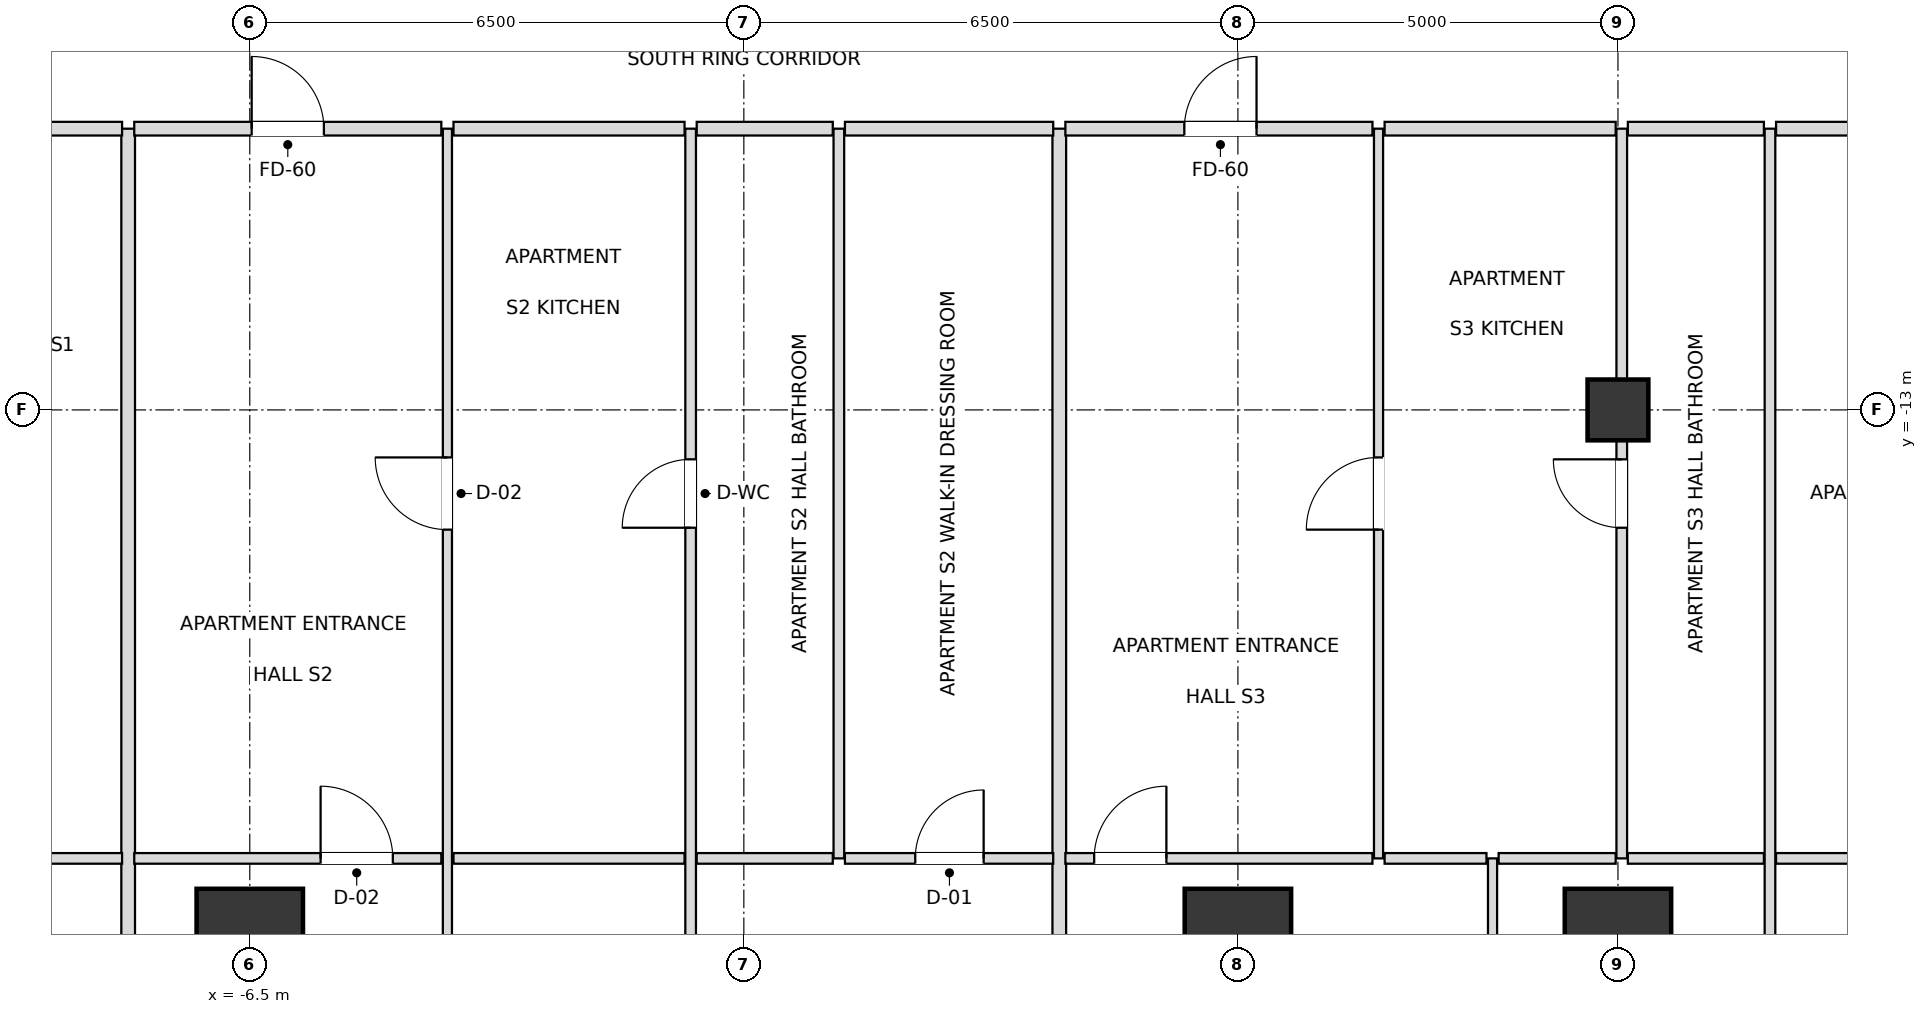
"""IFC4 building model, lengths in metres.
Left out: names, types, materials, properties, quantities, classifications, styles, units other than length and angle.
Written with IfcOpenShell. Run it as: python <this file> out.ifc"""

import sys

from ifc_helpers import new_model, si_unit, direction, frame, frame_2d, origin, origin_2d, place, context, subcontext, project, spatial, rectangle, extrude, element, fill, save


model = new_model("IFC4")
c1 = context("Model", 3, precision=1e-05, world=origin(), true_north=direction((0.0, 1.0)))
c2 = subcontext(c1, "Body", "Model", "MODEL_VIEW")
j1 = project(units=[si_unit("LENGTHUNIT", "METRE"), si_unit("PLANEANGLEUNIT", "RADIAN")], contexts=[c1])
p1 = place(None, origin())
s1 = spatial("IfcSite", under=j1, at=p1, CompositionType="ELEMENT")
p2 = place(p1, origin())
s2 = spatial("IfcBuilding", under=s1, at=p2, CompositionType="ELEMENT")
p3 = place(p2, frame((0.0, 0.0, 32.4)))
s3 = spatial("IfcBuildingStorey", under=s2, at=p3, CompositionType="ELEMENT", Elevation=32.4)
for number, where, z_axis, x_axis in (
    (1, (-6.5, -20.0, 0.0), (0.0, 0.0, 1.0), (1.0, 0.0, 0.0)),
    (2, (6.5, -20.0, 0.0), (0.0, 0.0, 1.0), (1.0, 0.0, 0.0)),
    (3, (11.5, -20.0, 0.0), (0.0, 0.0, 1.0), (1.0, 0.0, 0.0)),
):
    element("IfcColumn", number, at=place(p3, frame(where, z_axis=z_axis, x_axis=x_axis)), inside=s3, PredefinedType="USERDEFINED", context=c2, shape_type="SweptSolid", body=[
        extrude(rectangle(XDim=1.4, YDim=1.4, at=origin_2d()), origin(), (0.0, 0.0, 1.0), 3.6),
    ])
p4 = place(p3, frame((11.5, -13.0, 0.0), z_axis=(0.0, 0.0, 1.0), x_axis=(1.0, 0.0, 0.0)))
e4 = element("IfcColumn", 4, at=p4, inside=s3, PredefinedType="COLUMN", context=c2, shape_type="SweptSolid", body=[
    extrude(rectangle(XDim=0.8, YDim=0.8, at=origin_2d()), origin(), (0.0, 0.0, 1.0), 3.6),
])
p5 = place(p3, frame((-8.1, -24.9, 0.0), z_axis=(0.0, 0.0, 1.0), x_axis=(0.0, 1.0, 0.0)))
e5 = element("IfcWall", 5, at=p5, inside=s3, PredefinedType="PARTITIONING", context=c2, shape_type="SweptSolid", body=[
    extrude(rectangle(XDim=15.6, YDim=0.18, at=frame_2d((7.8, 0.0))), origin(), (0.0, 0.0, 1.0), 2.816),
])
p6 = place(p3, frame((-3.9, -24.9, 0.0), z_axis=(0.0, 0.0, 1.0), x_axis=(0.0, 1.0, 0.0)))
e6 = element("IfcWall", 6, at=p6, inside=s3, PredefinedType="PARTITIONING", context=c2, shape_type="SweptSolid", body=[
    extrude(rectangle(XDim=15.6, YDim=0.12, at=frame_2d((7.8, 0.0))), origin(), (0.0, 0.0, 1.0), 2.816),
])
p7 = place(p6, frame((10.325, 0.0, 0.0)))
e7 = element("IfcOpeningElement", 7, at=p7, cuts=e6, PredefinedType="OPENING", context=c2, shape_type="SweptSolid", body=[
    extrude(rectangle(XDim=0.95, YDim=2.1, at=frame_2d((0.475, 1.05))), frame((0.0, 0.07, 0.0), z_axis=(0.0, -1.0, 0.0), x_axis=(1.0, 0.0, 0.0)), (0.0, 0.0, 1.0), 0.14),
])
p8 = place(p6, frame((2.55, 0.0, 0.0)))
e8 = element("IfcOpeningElement", 8, at=p8, cuts=e6, PredefinedType="OPENING", context=c2, shape_type="SweptSolid", body=[
    extrude(rectangle(XDim=0.9, YDim=2.1, at=frame_2d((0.45, 1.05))), frame((0.0, 0.07, 0.0), z_axis=(0.0, -1.0, 0.0), x_axis=(1.0, 0.0, 0.0)), (0.0, 0.0, 1.0), 0.14),
])
p9 = place(p3, frame((-0.7, -24.9, 0.0), z_axis=(0.0, 0.0, 1.0), x_axis=(0.0, 1.0, 0.0)))
e9 = element("IfcWall", 9, at=p9, inside=s3, PredefinedType="PARTITIONING", context=c2, shape_type="SweptSolid", body=[
    extrude(rectangle(XDim=15.6, YDim=0.14, at=frame_2d((7.8, 0.0))), origin(), (0.0, 0.0, 1.0), 2.816),
])
p10 = place(p9, frame((10.35, 0.0, 0.0)))
e10 = element("IfcOpeningElement", 10, at=p10, cuts=e9, PredefinedType="OPENING", context=c2, shape_type="SweptSolid", body=[
    extrude(rectangle(XDim=0.9, YDim=2.1, at=frame_2d((0.45, 1.05))), frame((0.0, 0.08, 0.0), z_axis=(0.0, -1.0, 0.0), x_axis=(1.0, 0.0, 0.0)), (0.0, 0.0, 1.0), 0.16),
])
p11 = place(p9, frame((2.55, 0.0, 0.0)))
e11 = element("IfcOpeningElement", 11, at=p11, cuts=e9, PredefinedType="OPENING", context=c2, shape_type="SweptSolid", body=[
    extrude(rectangle(XDim=0.9, YDim=2.1, at=frame_2d((0.45, 1.05))), frame((0.0, 0.08, 0.0), z_axis=(0.0, -1.0, 0.0), x_axis=(1.0, 0.0, 0.0)), (0.0, 0.0, 1.0), 0.16),
])
p12 = place(p3, frame((1.25, -18.9, 0.0), z_axis=(0.0, 0.0, 1.0), x_axis=(0.0, 1.0, 0.0)))
e12 = element("IfcWall", 12, at=p12, inside=s3, PredefinedType="PARTITIONING", context=c2, shape_type="SweptSolid", body=[
    extrude(rectangle(XDim=9.6, YDim=0.14, at=frame_2d((4.8, 0.0))), origin(), (0.0, 0.0, 1.0), 2.948),
])
p13 = place(p3, frame((4.15, -24.9, 0.0), z_axis=(0.0, 0.0, 1.0), x_axis=(0.0, 1.0, 0.0)))
e13 = element("IfcWall", 13, at=p13, inside=s3, PredefinedType="PARTITIONING", context=c2, shape_type="SweptSolid", body=[
    extrude(rectangle(XDim=15.6, YDim=0.18, at=frame_2d((7.8, 0.0))), origin(), (0.0, 0.0, 1.0), 2.816),
])
p14 = place(p3, frame((8.35, -18.9, 0.0), z_axis=(0.0, 0.0, 1.0), x_axis=(0.0, 1.0, 0.0)))
e14 = element("IfcWall", 14, at=p14, inside=s3, PredefinedType="PARTITIONING", context=c2, shape_type="SweptSolid", body=[
    extrude(rectangle(XDim=9.6, YDim=0.12, at=frame_2d((4.8, 0.0))), origin(), (0.0, 0.0, 1.0), 2.816),
])
p15 = place(p14, frame((4.325, 0.0, 0.0)))
e15 = element("IfcOpeningElement", 15, at=p15, cuts=e14, PredefinedType="OPENING", context=c2, shape_type="SweptSolid", body=[
    extrude(rectangle(XDim=0.95, YDim=2.1, at=frame_2d((0.475, 1.05))), frame((0.0, 0.07, 0.0), z_axis=(0.0, -1.0, 0.0), x_axis=(1.0, 0.0, 0.0)), (0.0, 0.0, 1.0), 0.14),
])
p16 = place(p3, frame((9.85, -24.9, 0.0), z_axis=(0.0, 0.0, 1.0), x_axis=(0.0, 1.0, 0.0)))
e16 = element("IfcWall", 16, at=p16, inside=s3, PredefinedType="PARTITIONING", context=c2, shape_type="SweptSolid", body=[
    extrude(rectangle(XDim=6.0, YDim=0.12, at=frame_2d((3.0, 0.0))), origin(), (0.0, 0.0, 1.0), 2.816),
])
p17 = place(p16, frame((2.55, 0.0, 0.0)))
e17 = element("IfcOpeningElement", 17, at=p17, cuts=e16, PredefinedType="OPENING", context=c2, shape_type="SweptSolid", body=[
    extrude(rectangle(XDim=0.9, YDim=2.1, at=frame_2d((0.45, 1.05))), frame((0.0, 0.07, 0.0), z_axis=(0.0, -1.0, 0.0), x_axis=(1.0, 0.0, 0.0)), (0.0, 0.0, 1.0), 0.14),
])
p18 = place(p3, frame((11.55, -18.9, 0.0), z_axis=(0.0, 0.0, 1.0), x_axis=(0.0, 1.0, 0.0)))
e18 = element("IfcWall", 18, at=p18, inside=s3, PredefinedType="PARTITIONING", context=c2, shape_type="SweptSolid", body=[
    extrude(rectangle(XDim=9.6, YDim=0.14, at=frame_2d((4.8, 0.0))), origin(), (0.0, 0.0, 1.0), 2.736),
])
p19 = place(p18, frame((4.35, 0.0, 0.0)))
e19 = element("IfcOpeningElement", 19, at=p19, cuts=e18, PredefinedType="OPENING", context=c2, shape_type="SweptSolid", body=[
    extrude(rectangle(XDim=0.9, YDim=2.1, at=frame_2d((0.45, 1.05))), frame((0.0, 0.08, 0.0), z_axis=(0.0, -1.0, 0.0), x_axis=(1.0, 0.0, 0.0)), (0.0, 0.0, 1.0), 0.16),
])
p20 = place(p3, frame((13.5, -24.9, 0.0), z_axis=(0.0, 0.0, 1.0), x_axis=(0.0, 1.0, 0.0)))
e20 = element("IfcWall", 20, at=p20, inside=s3, PredefinedType="PARTITIONING", context=c2, shape_type="SweptSolid", body=[
    extrude(rectangle(XDim=15.6, YDim=0.14, at=frame_2d((7.8, 0.0))), origin(), (0.0, 0.0, 1.0), 2.736),
])
p21 = place(p20, frame((2.55, 0.0, 0.0)))
e21 = element("IfcOpeningElement", 21, at=p21, cuts=e20, PredefinedType="OPENING", context=c2, shape_type="SweptSolid", body=[
    extrude(rectangle(XDim=0.9, YDim=2.1, at=frame_2d((0.45, 1.05))), frame((0.0, 0.08, 0.0), z_axis=(0.0, -1.0, 0.0), x_axis=(1.0, 0.0, 0.0)), (0.0, 0.0, 1.0), 0.16),
])
p22 = place(p3, frame((-12.12, -18.9, 0.0), z_axis=(0.0, 0.0, 1.0), x_axis=(1.0, 0.0, 0.0)))
e22 = element("IfcWall", 22, at=p22, inside=s3, PredefinedType="PARTITIONING", context=c2, shape_type="SweptSolid", body=[
    extrude(rectangle(XDim=3.94, YDim=0.14, at=frame_2d((1.97, 0.0))), origin(), (0.0, 0.0, 1.0), 2.736),
])
p23 = place(p22, frame((1.485, 0.0, 0.0)))
e23 = element("IfcOpeningElement", 23, at=p23, cuts=e22, PredefinedType="OPENING", context=c2, shape_type="SweptSolid", body=[
    extrude(rectangle(XDim=0.95, YDim=2.1, at=frame_2d((0.475, 1.05))), frame((0.0, 0.08, 0.0), z_axis=(0.0, -1.0, 0.0), x_axis=(1.0, 0.0, 0.0)), (0.0, 0.0, 1.0), 0.16),
])
p24 = place(p3, frame((-8.02, -18.9, 0.0), z_axis=(0.0, 0.0, 1.0), x_axis=(1.0, 0.0, 0.0)))
e24 = element("IfcWall", 24, at=p24, inside=s3, PredefinedType="PARTITIONING", context=c2, shape_type="SweptSolid", body=[
    extrude(rectangle(XDim=4.04, YDim=0.14, at=frame_2d((2.02, 0.0))), origin(), (0.0, 0.0, 1.0), 2.816),
])
p25 = place(p24, frame((2.452, 0.0, 0.0)))
e25 = element("IfcOpeningElement", 25, at=p25, cuts=e24, PredefinedType="OPENING", context=c2, shape_type="SweptSolid", body=[
    extrude(rectangle(XDim=0.95, YDim=2.1, at=frame_2d((0.475, 1.05))), frame((0.0, 0.08, 0.0), z_axis=(0.0, -1.0, 0.0), x_axis=(1.0, 0.0, 0.0)), (0.0, 0.0, 1.0), 0.16),
])
p26 = place(p3, frame((-3.82, -18.9, 0.0), z_axis=(0.0, 0.0, 1.0), x_axis=(1.0, 0.0, 0.0)))
e26 = element("IfcWall", 26, at=p26, inside=s3, PredefinedType="PARTITIONING", context=c2, shape_type="SweptSolid", body=[
    extrude(rectangle(XDim=3.04, YDim=0.14, at=frame_2d((1.52, 0.0))), origin(), (0.0, 0.0, 1.0), 3.38),
])
p27 = place(p3, frame((-0.62, -18.9, 0.0), z_axis=(0.0, 0.0, 1.0), x_axis=(1.0, 0.0, 0.0)))
e27 = element("IfcWall", 27, at=p27, inside=s3, PredefinedType="PARTITIONING", context=c2, shape_type="SweptSolid", body=[
    extrude(rectangle(XDim=1.79, YDim=0.14, at=frame_2d((0.895, 0.0))), origin(), (0.0, 0.0, 1.0), 3.38),
])
p28 = place(p3, frame((1.33, -18.9, 0.0), z_axis=(0.0, 0.0, 1.0), x_axis=(1.0, 0.0, 0.0)))
e28 = element("IfcWall", 28, at=p28, inside=s3, PredefinedType="PARTITIONING", context=c2, shape_type="SweptSolid", body=[
    extrude(rectangle(XDim=2.74, YDim=0.14, at=frame_2d((1.37, 0.0))), origin(), (0.0, 0.0, 1.0), 3.38),
])
p29 = place(p28, frame((0.925, 0.0, 0.0)))
e29 = element("IfcOpeningElement", 29, at=p29, cuts=e28, PredefinedType="OPENING", context=c2, shape_type="SweptSolid", body=[
    extrude(rectangle(XDim=0.9, YDim=2.1, at=frame_2d((0.45, 1.05))), frame((0.0, 0.08, 0.0), z_axis=(0.0, -1.0, 0.0), x_axis=(1.0, 0.0, 0.0)), (0.0, 0.0, 1.0), 0.16),
])
p30 = place(p3, frame((4.23, -18.9, 0.0), z_axis=(0.0, 0.0, 1.0), x_axis=(1.0, 0.0, 0.0)))
e30 = element("IfcWall", 30, at=p30, inside=s3, PredefinedType="PARTITIONING", context=c2, shape_type="SweptSolid", body=[
    extrude(rectangle(XDim=4.04, YDim=0.14, at=frame_2d((2.02, 0.0))), origin(), (0.0, 0.0, 1.0), 2.816),
])
p31 = place(p30, frame((0.379, 0.0, 0.0)))
e31 = element("IfcOpeningElement", 31, at=p31, cuts=e30, PredefinedType="OPENING", context=c2, shape_type="SweptSolid", body=[
    extrude(rectangle(XDim=0.95, YDim=2.1, at=frame_2d((0.475, 1.05))), frame((0.0, 0.08, 0.0), z_axis=(0.0, -1.0, 0.0), x_axis=(1.0, 0.0, 0.0)), (0.0, 0.0, 1.0), 0.16),
])
p32 = place(p3, frame((8.43, -18.9, 0.0), z_axis=(0.0, 0.0, 1.0), x_axis=(1.0, 0.0, 0.0)))
e32 = element("IfcWall", 32, at=p32, inside=s3, PredefinedType="PARTITIONING", context=c2, shape_type="SweptSolid", body=[
    extrude(rectangle(XDim=1.34, YDim=0.14, at=frame_2d((0.67, 0.0))), origin(), (0.0, 0.0, 1.0), 3.38),
])
p33 = place(p3, frame((9.93, -18.9, 0.0), z_axis=(0.0, 0.0, 1.0), x_axis=(1.0, 0.0, 0.0)))
e33 = element("IfcWall", 33, at=p33, inside=s3, PredefinedType="PARTITIONING", context=c2, shape_type="SweptSolid", body=[
    extrude(rectangle(XDim=1.54, YDim=0.14, at=frame_2d((0.77, 0.0))), origin(), (0.0, 0.0, 1.0), 3.38),
])
p34 = place(p3, frame((11.63, -18.9, 0.0), z_axis=(0.0, 0.0, 1.0), x_axis=(1.0, 0.0, 0.0)))
e34 = element("IfcWall", 34, at=p34, inside=s3, PredefinedType="PARTITIONING", context=c2, shape_type="SweptSolid", body=[
    extrude(rectangle(XDim=1.79, YDim=0.14, at=frame_2d((0.895, 0.0))), origin(), (0.0, 0.0, 1.0), 2.736),
])
p35 = place(p3, frame((13.58, -18.9, 0.0), z_axis=(0.0, 0.0, 1.0), x_axis=(1.0, 0.0, 0.0)))
e35 = element("IfcWall", 35, at=p35, inside=s3, PredefinedType="PARTITIONING", context=c2, shape_type="SweptSolid", body=[
    extrude(rectangle(XDim=4.74, YDim=0.14, at=frame_2d((2.37, 0.0))), origin(), (0.0, 0.0, 1.0), 2.736),
])
p36 = place(p35, frame((1.905, 0.0, 0.0)))
e36 = element("IfcOpeningElement", 36, at=p36, cuts=e35, PredefinedType="OPENING", context=c2, shape_type="SweptSolid", body=[
    extrude(rectangle(XDim=0.95, YDim=2.1, at=frame_2d((0.475, 1.05))), frame((0.0, 0.08, 0.0), z_axis=(0.0, -1.0, 0.0), x_axis=(1.0, 0.0, 0.0)), (0.0, 0.0, 1.0), 0.16),
])
p37 = place(p3, frame((-13.67, -9.3, 0.0), z_axis=(0.0, 0.0, 1.0), x_axis=(1.0, 0.0, 0.0)))
e37 = element("IfcWall", 37, at=p37, inside=s3, PredefinedType="PARTITIONING", context=c2, shape_type="SweptSolid", body=[
    extrude(rectangle(XDim=5.49, YDim=0.18, at=frame_2d((2.745, 0.0))), origin(), (0.0, 0.0, 1.0), 3.38),
])
p38 = place(p37, frame((3.245, 0.0, 0.0)))
e38 = element("IfcOpeningElement", 38, at=p38, cuts=e37, PredefinedType="OPENING", context=c2, shape_type="SweptSolid", body=[
    extrude(rectangle(XDim=0.95, YDim=2.15, at=frame_2d((0.475, 1.075))), frame((0.0, 0.1, 0.0), z_axis=(0.0, -1.0, 0.0), x_axis=(1.0, 0.0, 0.0)), (0.0, 0.0, 1.0), 0.2),
])
p39 = place(p3, frame((-8.02, -9.3, 0.0), z_axis=(0.0, 0.0, 1.0), x_axis=(1.0, 0.0, 0.0)))
e39 = element("IfcWall", 39, at=p39, inside=s3, PredefinedType="PARTITIONING", context=c2, shape_type="SweptSolid", body=[
    extrude(rectangle(XDim=4.04, YDim=0.18, at=frame_2d((2.02, 0.0))), origin(), (0.0, 0.0, 1.0), 2.816),
])
p40 = place(p39, frame((1.545, 0.0, 0.0)))
e40 = element("IfcOpeningElement", 40, at=p40, cuts=e39, PredefinedType="OPENING", context=c2, shape_type="SweptSolid", body=[
    extrude(rectangle(XDim=0.95, YDim=2.15, at=frame_2d((0.475, 1.075))), frame((0.0, 0.1, 0.0), z_axis=(0.0, -1.0, 0.0), x_axis=(1.0, 0.0, 0.0)), (0.0, 0.0, 1.0), 0.2),
])
p41 = place(p3, frame((-3.82, -9.3, 0.0), z_axis=(0.0, 0.0, 1.0), x_axis=(1.0, 0.0, 0.0)))
e41 = element("IfcWall", 41, at=p41, inside=s3, PredefinedType="PARTITIONING", context=c2, shape_type="SweptSolid", body=[
    extrude(rectangle(XDim=3.04, YDim=0.18, at=frame_2d((1.52, 0.0))), origin(), (0.0, 0.0, 1.0), 3.38),
])
p42 = place(p3, frame((-0.62, -9.3, 0.0), z_axis=(0.0, 0.0, 1.0), x_axis=(1.0, 0.0, 0.0)))
e42 = element("IfcWall", 42, at=p42, inside=s3, PredefinedType="PARTITIONING", context=c2, shape_type="SweptSolid", body=[
    extrude(rectangle(XDim=1.79, YDim=0.18, at=frame_2d((0.895, 0.0))), origin(), (0.0, 0.0, 1.0), 3.38),
])
p43 = place(p3, frame((1.33, -9.3, 0.0), z_axis=(0.0, 0.0, 1.0), x_axis=(1.0, 0.0, 0.0)))
e43 = element("IfcWall", 43, at=p43, inside=s3, PredefinedType="PARTITIONING", context=c2, shape_type="SweptSolid", body=[
    extrude(rectangle(XDim=2.74, YDim=0.18, at=frame_2d((1.37, 0.0))), origin(), (0.0, 0.0, 1.0), 3.38),
])
p44 = place(p3, frame((4.23, -9.3, 0.0), z_axis=(0.0, 0.0, 1.0), x_axis=(1.0, 0.0, 0.0)))
e44 = element("IfcWall", 44, at=p44, inside=s3, PredefinedType="PARTITIONING", context=c2, shape_type="SweptSolid", body=[
    extrude(rectangle(XDim=4.04, YDim=0.18, at=frame_2d((2.02, 0.0))), origin(), (0.0, 0.0, 1.0), 2.816),
])
p45 = place(p44, frame((1.565, 0.0, 0.0)))
e45 = element("IfcOpeningElement", 45, at=p45, cuts=e44, PredefinedType="OPENING", context=c2, shape_type="SweptSolid", body=[
    extrude(rectangle(XDim=0.95, YDim=2.15, at=frame_2d((0.475, 1.075))), frame((0.0, 0.1, 0.0), z_axis=(0.0, -1.0, 0.0), x_axis=(1.0, 0.0, 0.0)), (0.0, 0.0, 1.0), 0.2),
])
p46 = place(p3, frame((8.43, -9.3, 0.0), z_axis=(0.0, 0.0, 1.0), x_axis=(1.0, 0.0, 0.0)))
e46 = element("IfcWall", 46, at=p46, inside=s3, PredefinedType="PARTITIONING", context=c2, shape_type="SweptSolid", body=[
    extrude(rectangle(XDim=3.04, YDim=0.18, at=frame_2d((1.52, 0.0))), origin(), (0.0, 0.0, 1.0), 3.38),
])
p47 = place(p3, frame((11.63, -9.3, 0.0), z_axis=(0.0, 0.0, 1.0), x_axis=(1.0, 0.0, 0.0)))
e47 = element("IfcWall", 47, at=p47, inside=s3, PredefinedType="PARTITIONING", context=c2, shape_type="SweptSolid", body=[
    extrude(rectangle(XDim=1.79, YDim=0.18, at=frame_2d((0.895, 0.0))), origin(), (0.0, 0.0, 1.0), 3.38),
])
p48 = place(p3, frame((13.58, -9.3, 0.0), z_axis=(0.0, 0.0, 1.0), x_axis=(1.0, 0.0, 0.0)))
e48 = element("IfcWall", 48, at=p48, inside=s3, PredefinedType="PARTITIONING", context=c2, shape_type="SweptSolid", body=[
    extrude(rectangle(XDim=4.74, YDim=0.18, at=frame_2d((2.37, 0.0))), origin(), (0.0, 0.0, 1.0), 2.816),
])
p49 = place(p40, origin())
e49 = element("IfcDoor", 49, at=p49, inside=s3, OperationType="SINGLE_SWING_LEFT", PredefinedType="DOOR", context=c2, shape_type="SweptSolid", body=[
    extrude(rectangle(XDim=0.95, YDim=2.15, at=frame_2d((0.475, 1.075))), frame((0.0, 0.025, 0.0), z_axis=(0.0, -1.0, 0.0), x_axis=(1.0, 0.0, 0.0)), (0.0, 0.0, 1.0), 0.05),
])
fill(e40, e49)
p50 = place(p7, origin())
e50 = element("IfcDoor", 50, at=p50, inside=s3, OperationType="SINGLE_SWING_RIGHT", PredefinedType="DOOR", context=c2, shape_type="SweptSolid", body=[
    extrude(rectangle(XDim=0.95, YDim=2.1, at=frame_2d((0.475, 1.05))), frame((0.0, 0.025, 0.0), z_axis=(0.0, -1.0, 0.0), x_axis=(1.0, 0.0, 0.0)), (0.0, 0.0, 1.0), 0.05),
])
fill(e7, e50)
p51 = place(p10, origin())
e51 = element("IfcDoor", 51, at=p51, inside=s3, OperationType="SINGLE_SWING_LEFT", PredefinedType="DOOR", context=c2, shape_type="SweptSolid", body=[
    extrude(rectangle(XDim=0.9, YDim=2.1, at=frame_2d((0.45, 1.05))), frame((0.0, 0.025, 0.0), z_axis=(0.0, -1.0, 0.0), x_axis=(1.0, 0.0, 0.0)), (0.0, 0.0, 1.0), 0.05),
])
fill(e10, e51)
p52 = place(p29, origin())
e52 = element("IfcDoor", 52, at=p52, inside=s3, OperationType="SINGLE_SWING_RIGHT", PredefinedType="DOOR", context=c2, shape_type="SweptSolid", body=[
    extrude(rectangle(XDim=0.9, YDim=2.1, at=frame_2d((0.45, 1.05))), frame((0.0, 0.025, 0.0), z_axis=(0.0, -1.0, 0.0), x_axis=(1.0, 0.0, 0.0)), (0.0, 0.0, 1.0), 0.05),
])
fill(e29, e52)
p53 = place(p25, origin())
e53 = element("IfcDoor", 53, at=p53, inside=s3, OperationType="SINGLE_SWING_LEFT", PredefinedType="DOOR", context=c2, shape_type="SweptSolid", body=[
    extrude(rectangle(XDim=0.95, YDim=2.1, at=frame_2d((0.475, 1.05))), frame((0.0, 0.025, 0.0), z_axis=(0.0, -1.0, 0.0), x_axis=(1.0, 0.0, 0.0)), (0.0, 0.0, 1.0), 0.05),
])
fill(e25, e53)
p54 = place(p45, origin())
e54 = element("IfcDoor", 54, at=p54, inside=s3, OperationType="SINGLE_SWING_RIGHT", PredefinedType="DOOR", context=c2, shape_type="SweptSolid", body=[
    extrude(rectangle(XDim=0.95, YDim=2.15, at=frame_2d((0.475, 1.075))), frame((0.0, 0.025, 0.0), z_axis=(0.0, -1.0, 0.0), x_axis=(1.0, 0.0, 0.0)), (0.0, 0.0, 1.0), 0.05),
])
fill(e45, e54)
p55 = place(p15, origin())
e55 = element("IfcDoor", 55, at=p55, inside=s3, OperationType="SINGLE_SWING_LEFT", PredefinedType="DOOR", context=c2, shape_type="SweptSolid", body=[
    extrude(rectangle(XDim=0.95, YDim=2.1, at=frame_2d((0.475, 1.05))), frame((0.0, 0.025, 0.0), z_axis=(0.0, -1.0, 0.0), x_axis=(1.0, 0.0, 0.0)), (0.0, 0.0, 1.0), 0.05),
])
fill(e15, e55)
p56 = place(p19, origin())
e56 = element("IfcDoor", 56, at=p56, inside=s3, OperationType="SINGLE_SWING_RIGHT", PredefinedType="DOOR", context=c2, shape_type="SweptSolid", body=[
    extrude(rectangle(XDim=0.9, YDim=2.1, at=frame_2d((0.45, 1.05))), frame((0.0, 0.025, 0.0), z_axis=(0.0, -1.0, 0.0), x_axis=(1.0, 0.0, 0.0)), (0.0, 0.0, 1.0), 0.05),
])
fill(e19, e56)
p57 = place(p31, origin())
e57 = element("IfcDoor", 57, at=p57, inside=s3, OperationType="SINGLE_SWING_RIGHT", PredefinedType="DOOR", context=c2, shape_type="SweptSolid", body=[
    extrude(rectangle(XDim=0.95, YDim=2.1, at=frame_2d((0.475, 1.05))), frame((0.0, 0.025, 0.0), z_axis=(0.0, -1.0, 0.0), x_axis=(1.0, 0.0, 0.0)), (0.0, 0.0, 1.0), 0.05),
])
fill(e31, e57)
save(model, sys.argv[1])
